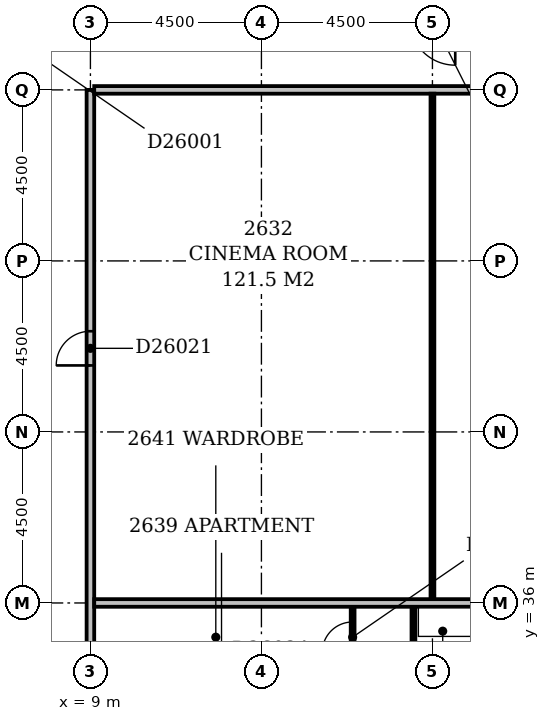
"""IFC4 building model, lengths in metres.
Left out: names, types, materials, properties, quantities, classifications, styles, units other than length and angle.
Written with IfcOpenShell. Run it as: python <this file> out.ifc"""

import sys

from ifc_helpers import new_model, si_unit, direction, frame, frame_2d, origin, place, context, subcontext, project, spatial, rectangle, extrude, element, fill, save


model = new_model("IFC4")
c1 = context("Model", 3, precision=1e-05, world=origin(), true_north=direction((0.0, 1.0)))
c2 = subcontext(c1, "Body", "Model", "MODEL_VIEW")
j1 = project(units=[si_unit("LENGTHUNIT", "METRE"), si_unit("PLANEANGLEUNIT", "RADIAN")], contexts=[c1])
p1 = place(None, origin())
s1 = spatial("IfcSite", under=j1, at=p1, CompositionType="ELEMENT")
p2 = place(p1, origin())
s2 = spatial("IfcBuilding", under=s1, at=p2, CompositionType="ELEMENT")
p3 = place(p2, frame((0.0, 0.0, 104.6)))
s3 = spatial("IfcBuildingStorey", under=s2, at=p3, CompositionType="ELEMENT", Elevation=104.6)
p4 = place(p3, frame((9.0, 5.0, 0.0), z_axis=(0.0, 0.0, 1.0), x_axis=(0.0, 1.0, 0.0)))
e1 = element("IfcWall", 1, at=p4, inside=s3, PredefinedType="PARTITIONING", context=c2, shape_type="SweptSolid", body=[
    extrude(rectangle(XDim=44.5, YDim=0.2, at=frame_2d((22.25, 0.0))), origin(), (0.0, 0.0, 1.0), 3.15),
])
p5 = place(p4, frame((18.4, 0.0, 0.0)))
e2 = element("IfcOpeningElement", 2, at=p5, cuts=e1, PredefinedType="OPENING", context=c2, shape_type="SweptSolid", body=[
    extrude(rectangle(XDim=1.0, YDim=2.1, at=frame_2d((0.5, 1.05))), frame((0.0, 0.112, 0.0), z_axis=(0.0, -1.0, 0.0), x_axis=(1.0, 0.0, 0.0)), (0.0, 0.0, 1.0), 0.224),
])
p6 = place(p4, frame((9.3, 0.0, 0.0)))
e3 = element("IfcOpeningElement", 3, at=p6, cuts=e1, PredefinedType="OPENING", context=c2, shape_type="SweptSolid", body=[
    extrude(rectangle(XDim=1.0, YDim=2.1, at=frame_2d((0.5, 1.05))), frame((0.0, 0.112, 0.0), z_axis=(0.0, -1.0, 0.0), x_axis=(1.0, 0.0, 0.0)), (0.0, 0.0, 1.0), 0.224),
])
p7 = place(p4, frame((37.25, 0.0, 0.0)))
e4 = element("IfcOpeningElement", 4, at=p7, cuts=e1, PredefinedType="OPENING", context=c2, shape_type="SweptSolid", body=[
    extrude(rectangle(XDim=0.9, YDim=2.1, at=frame_2d((0.45, 1.05))), frame((0.0, 0.112, 0.0), z_axis=(0.0, -1.0, 0.0), x_axis=(1.0, 0.0, 0.0)), (0.0, 0.0, 1.0), 0.224),
])
p8 = place(p4, frame((1.5, 0.0, 0.0)))
e5 = element("IfcOpeningElement", 5, at=p8, cuts=e1, PredefinedType="OPENING", context=c2, shape_type="SweptSolid", body=[
    extrude(rectangle(XDim=0.9, YDim=2.1, at=frame_2d((0.45, 1.05))), frame((0.0, 0.112, 0.0), z_axis=(0.0, -1.0, 0.0), x_axis=(1.0, 0.0, 0.0)), (0.0, 0.0, 1.0), 0.224),
])
p9 = place(p3, frame((17.5, 18.1, 0.0), z_axis=(0.0, 0.0, 1.0), x_axis=(0.0, 1.0, 0.0)))
e6 = element("IfcWall", 6, at=p9, inside=s3, PredefinedType="PARTITIONING", context=c2, shape_type="SweptSolid", body=[
    extrude(rectangle(XDim=17.8, YDim=0.1, at=frame_2d((8.9, 0.0))), origin(), (0.0, 0.0, 1.0), 3.15),
])
p10 = place(p9, frame((2.85, 0.0, 0.0)))
e7 = element("IfcOpeningElement", 7, at=p10, cuts=e6, PredefinedType="OPENING", context=c2, shape_type="SweptSolid", body=[
    extrude(rectangle(XDim=0.9, YDim=2.1, at=frame_2d((0.45, 1.05))), frame((0.0, 0.062, 0.0), z_axis=(0.0, -1.0, 0.0), x_axis=(1.0, 0.0, 0.0)), (0.0, 0.0, 1.0), 0.124),
])
p11 = place(p9, frame((8.4, 0.0, 0.0)))
e8 = element("IfcOpeningElement", 8, at=p11, cuts=e6, PredefinedType="OPENING", context=c2, shape_type="SweptSolid", body=[
    extrude(rectangle(XDim=0.9, YDim=2.1, at=frame_2d((0.45, 1.05))), frame((0.0, 0.062, 0.0), z_axis=(0.0, -1.0, 0.0), x_axis=(1.0, 0.0, 0.0)), (0.0, 0.0, 1.0), 0.124),
])
p12 = place(p9, frame((14.05, 0.0, 0.0)))
e9 = element("IfcOpeningElement", 9, at=p12, cuts=e6, PredefinedType="OPENING", context=c2, shape_type="SweptSolid", body=[
    extrude(rectangle(XDim=0.9, YDim=2.1, at=frame_2d((0.45, 1.05))), frame((0.0, 0.062, 0.0), z_axis=(0.0, -1.0, 0.0), x_axis=(1.0, 0.0, 0.0)), (0.0, 0.0, 1.0), 0.124),
])
p13 = place(p3, frame((15.9, 24.7, 0.0), z_axis=(0.0, 0.0, 1.0), x_axis=(0.0, 1.0, 0.0)))
e10 = element("IfcWall", 10, at=p13, inside=s3, PredefinedType="PARTITIONING", context=c2, shape_type="SweptSolid", body=[
    extrude(rectangle(XDim=11.2, YDim=0.1, at=frame_2d((5.6, 0.0))), origin(), (0.0, 0.0, 1.0), 3.15),
])
p14 = place(p13, frame((0.8, 0.0, 0.0)))
e11 = element("IfcOpeningElement", 11, at=p14, cuts=e10, PredefinedType="OPENING", context=c2, shape_type="SweptSolid", body=[
    extrude(rectangle(XDim=0.8, YDim=2.1, at=frame_2d((0.4, 1.05))), frame((0.0, 0.062, 0.0), z_axis=(0.0, -1.0, 0.0), x_axis=(1.0, 0.0, 0.0)), (0.0, 0.0, 1.0), 0.124),
])
p15 = place(p13, frame((8.1, 0.0, 0.0)))
e12 = element("IfcOpeningElement", 12, at=p15, cuts=e10, PredefinedType="OPENING", context=c2, shape_type="SweptSolid", body=[
    extrude(rectangle(XDim=0.8, YDim=2.1, at=frame_2d((0.4, 1.05))), frame((0.0, 0.062, 0.0), z_axis=(0.0, -1.0, 0.0), x_axis=(1.0, 0.0, 0.0)), (0.0, 0.0, 1.0), 0.124),
])
p16 = place(p13, frame((4.3, 0.0, 0.0)))
e13 = element("IfcOpeningElement", 13, at=p16, cuts=e10, PredefinedType="OPENING", context=c2, shape_type="SweptSolid", body=[
    extrude(rectangle(XDim=0.8, YDim=2.1, at=frame_2d((0.4, 1.05))), frame((0.0, 0.062, 0.0), z_axis=(0.0, -1.0, 0.0), x_axis=(1.0, 0.0, 0.0)), (0.0, 0.0, 1.0), 0.124),
])
p17 = place(p13, frame((6.1, 0.0, 0.0)))
e14 = element("IfcOpeningElement", 14, at=p17, cuts=e10, PredefinedType="OPENING", context=c2, shape_type="SweptSolid", body=[
    extrude(rectangle(XDim=0.8, YDim=2.1, at=frame_2d((0.4, 1.05))), frame((0.0, 0.062, 0.0), z_axis=(0.0, -1.0, 0.0), x_axis=(1.0, 0.0, 0.0)), (0.0, 0.0, 1.0), 0.124),
])
p18 = place(p13, frame((10.0, 0.0, 0.0)))
e15 = element("IfcOpeningElement", 15, at=p18, cuts=e10, PredefinedType="OPENING", context=c2, shape_type="SweptSolid", body=[
    extrude(rectangle(XDim=0.8, YDim=2.1, at=frame_2d((0.4, 1.05))), frame((0.0, 0.062, 0.0), z_axis=(0.0, -1.0, 0.0), x_axis=(1.0, 0.0, 0.0)), (0.0, 0.0, 1.0), 0.124),
])
p19 = place(p13, frame((2.75, 0.0, 0.0)))
e16 = element("IfcOpeningElement", 16, at=p19, cuts=e10, PredefinedType="OPENING", context=c2, shape_type="SweptSolid", body=[
    extrude(rectangle(XDim=0.8, YDim=2.1, at=frame_2d((0.4, 1.05))), frame((0.0, 0.062, 0.0), z_axis=(0.0, -1.0, 0.0), x_axis=(1.0, 0.0, 0.0)), (0.0, 0.0, 1.0), 0.124),
])
p20 = place(p3, frame((9.1, 36.0, 0.0), z_axis=(0.0, 0.0, 1.0), x_axis=(1.0, 0.0, 0.0)))
e17 = element("IfcWall", 17, at=p20, inside=s3, PredefinedType="PARTITIONING", context=c2, shape_type="SweptSolid", body=[
    extrude(rectangle(XDim=12.8, YDim=0.2, at=frame_2d((6.4, 0.0))), origin(), (0.0, 0.0, 1.0), 2.25),
])
p21 = place(p3, frame((18.0, 36.1, 0.0), z_axis=(0.0, 0.0, 1.0), x_axis=(0.0, 1.0, 0.0)))
e18 = element("IfcWall", 18, at=p21, inside=s3, PredefinedType="PARTITIONING", context=c2, shape_type="SweptSolid", body=[
    extrude(rectangle(XDim=13.3, YDim=0.1, at=frame_2d((6.65, 0.0))), origin(), (0.0, 0.0, 1.0), 3.15),
])
p22 = place(p3, frame((9.1, 49.5, 0.0), z_axis=(0.0, 0.0, 1.0), x_axis=(1.0, 0.0, 0.0)))
e19 = element("IfcWall", 19, at=p22, inside=s3, PredefinedType="PARTITIONING", context=c2, shape_type="SweptSolid", body=[
    extrude(rectangle(XDim=57.8, YDim=0.2, at=frame_2d((28.9, 0.0))), origin(), (0.0, 0.0, 1.0), 3.15),
])
p23 = place(p22, frame((14.95, 0.0, 0.0)))
e20 = element("IfcOpeningElement", 20, at=p23, cuts=e19, PredefinedType="OPENING", context=c2, shape_type="SweptSolid", body=[
    extrude(rectangle(XDim=1.0, YDim=2.1, at=frame_2d((0.5, 1.05))), frame((0.0, 0.112, 0.0), z_axis=(0.0, -1.0, 0.0), x_axis=(1.0, 0.0, 0.0)), (0.0, 0.0, 1.0), 0.224),
])
p24 = place(p22, frame((20.6, 0.0, 0.0)))
e21 = element("IfcOpeningElement", 21, at=p24, cuts=e19, PredefinedType="OPENING", context=c2, shape_type="SweptSolid", body=[
    extrude(rectangle(XDim=1.0, YDim=2.1, at=frame_2d((0.5, 1.05))), frame((0.0, 0.112, 0.0), z_axis=(0.0, -1.0, 0.0), x_axis=(1.0, 0.0, 0.0)), (0.0, 0.0, 1.0), 0.224),
])
p25 = place(p22, frame((27.2, 0.0, 0.0)))
e22 = element("IfcOpeningElement", 22, at=p25, cuts=e19, PredefinedType="OPENING", context=c2, shape_type="SweptSolid", body=[
    extrude(rectangle(XDim=1.0, YDim=2.1, at=frame_2d((0.5, 1.05))), frame((0.0, 0.112, 0.0), z_axis=(0.0, -1.0, 0.0), x_axis=(1.0, 0.0, 0.0)), (0.0, 0.0, 1.0), 0.224),
])
p26 = place(p22, frame((40.7, 0.0, 0.0)))
e23 = element("IfcOpeningElement", 23, at=p26, cuts=e19, PredefinedType="OPENING", context=c2, shape_type="SweptSolid", body=[
    extrude(rectangle(XDim=1.0, YDim=2.1, at=frame_2d((0.5, 1.05))), frame((0.0, 0.112, 0.0), z_axis=(0.0, -1.0, 0.0), x_axis=(1.0, 0.0, 0.0)), (0.0, 0.0, 1.0), 0.224),
])
p27 = place(p22, frame((10.65, 0.0, 0.0)))
e24 = element("IfcOpeningElement", 24, at=p27, cuts=e19, PredefinedType="OPENING", context=c2, shape_type="SweptSolid", body=[
    extrude(rectangle(XDim=0.9, YDim=2.1, at=frame_2d((0.45, 1.05))), frame((0.0, 0.112, 0.0), z_axis=(0.0, -1.0, 0.0), x_axis=(1.0, 0.0, 0.0)), (0.0, 0.0, 1.0), 0.224),
])
p28 = place(p7, origin())
e25 = element("IfcDoor", 25, at=p28, inside=s3, OperationType="SINGLE_SWING_LEFT", PredefinedType="DOOR", context=c2, shape_type="SweptSolid", body=[
    extrude(rectangle(XDim=0.9, YDim=2.1, at=frame_2d((0.45, 1.05))), frame((0.0, 0.025, 0.0), z_axis=(0.0, -1.0, 0.0), x_axis=(1.0, 0.0, 0.0)), (0.0, 0.0, 1.0), 0.05),
])
fill(e4, e25)
p29 = place(p18, origin())
e26 = element("IfcDoor", 26, at=p29, inside=s3, OperationType="SINGLE_SWING_LEFT", PredefinedType="DOOR", context=c2, shape_type="SweptSolid", body=[
    extrude(rectangle(XDim=0.8, YDim=2.1, at=frame_2d((0.4, 1.05))), frame((0.0, 0.025, 0.0), z_axis=(0.0, -1.0, 0.0), x_axis=(1.0, 0.0, 0.0)), (0.0, 0.0, 1.0), 0.05),
])
fill(e15, e26)
save(model, sys.argv[1])
